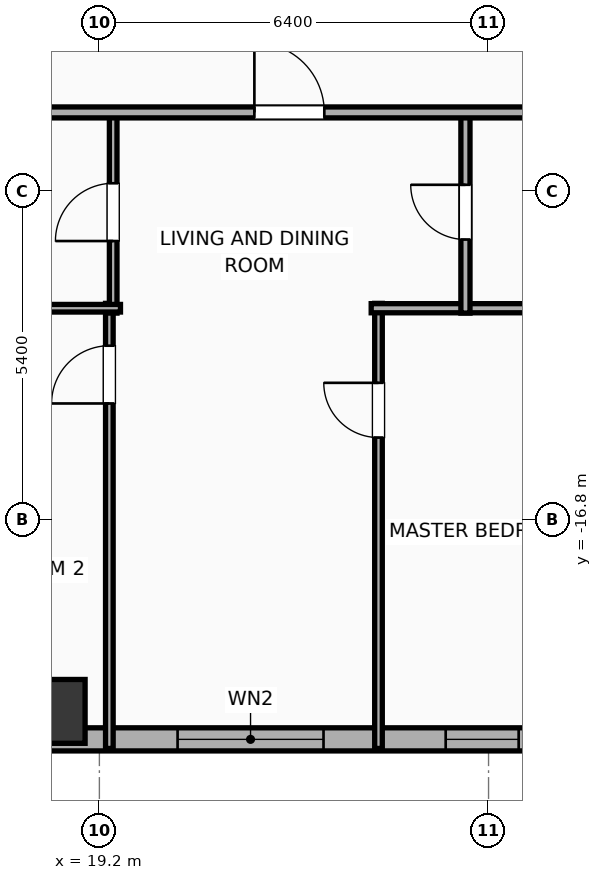
"""IFC4 building model, lengths in metres.
Left out: names, types, materials, properties, quantities, classifications, styles, units other than length and angle.
Written with IfcOpenShell. Run it as: python <this file> out.ifc"""

import sys

from ifc_helpers import new_model, si_unit, direction, frame, frame_2d, origin, origin_2d, place, context, subcontext, project, spatial, rectangle, hollow_rectangle, extrude, element, fill, save


model = new_model("IFC4")
c1 = context("Model", 3, precision=1e-05, world=origin(), true_north=direction((0.0, 1.0)))
c2 = subcontext(c1, "Body", "Model", "MODEL_VIEW")
j1 = project(units=[si_unit("LENGTHUNIT", "METRE"), si_unit("PLANEANGLEUNIT", "RADIAN")], contexts=[c1])
p1 = place(None, origin())
s1 = spatial("IfcSite", under=j1, at=p1, CompositionType="ELEMENT")
p2 = place(p1, origin())
s2 = spatial("IfcBuilding", under=s1, at=p2, CompositionType="ELEMENT")
p3 = place(p2, frame((0.0, 0.0, 101.4)))
s3 = spatial("IfcBuildingStorey", under=s2, at=p3, CompositionType="ELEMENT", Elevation=101.4)
p4 = place(p3, frame((18.44, -19.95, 0.0), z_axis=(0.0, 0.0, 1.0), x_axis=(1.0, 0.0, 0.0)))
e1 = element("IfcColumn", 1, at=p4, inside=s3, PredefinedType="COLUMN", context=c2, shape_type="SweptSolid", body=[
    extrude(hollow_rectangle(XDim=1.05, YDim=1.05, WallThickness=0.036, at=origin_2d()), origin(), (0.0, 0.0, 1.0), 3.9),
])
p5 = place(p3, frame((29.381, -20.41, 0.0), z_axis=(0.0, 0.0, 1.0), x_axis=(-1.0, 0.0, 0.0)))
e2 = element("IfcWall", 2, at=p5, inside=s3, PredefinedType="ELEMENTEDWALL", context=c2, shape_type="SweptSolid", body=[
    extrude(rectangle(XDim=54.763, YDim=0.38, at=frame_2d((27.381, 0.0))), origin(), (0.0, 0.0, 1.0), 3.65),
])
p6 = place(p5, frame((6.495, 0.0, 0.75)))
e3 = element("IfcOpeningElement", 3, at=p6, cuts=e2, PredefinedType="OPENING", context=c2, shape_type="SweptSolid", body=[
    extrude(rectangle(XDim=2.4, YDim=2.1, at=frame_2d((1.2, 1.05))), frame((0.0, 0.2, 0.0), z_axis=(0.0, -1.0, 0.0), x_axis=(1.0, 0.0, 0.0)), (0.0, 0.0, 1.0), 0.4),
])
p7 = place(p5, frame((17.686, 0.0, 0.75)))
e4 = element("IfcOpeningElement", 4, at=p7, cuts=e2, PredefinedType="OPENING", context=c2, shape_type="SweptSolid", body=[
    extrude(rectangle(XDim=2.4, YDim=2.1, at=frame_2d((1.2, 1.05))), frame((0.0, 0.2, 0.0), z_axis=(0.0, -1.0, 0.0), x_axis=(1.0, 0.0, 0.0)), (0.0, 0.0, 1.0), 0.4),
])
p8 = place(p5, frame((34.677, 0.0, 0.75)))
e5 = element("IfcOpeningElement", 5, at=p8, cuts=e2, PredefinedType="OPENING", context=c2, shape_type="SweptSolid", body=[
    extrude(rectangle(XDim=2.4, YDim=2.1, at=frame_2d((1.2, 1.05))), frame((0.0, 0.2, 0.0), z_axis=(0.0, -1.0, 0.0), x_axis=(1.0, 0.0, 0.0)), (0.0, 0.0, 1.0), 0.4),
])
p9 = place(p5, frame((45.867, 0.0, 0.75)))
e6 = element("IfcOpeningElement", 6, at=p9, cuts=e2, PredefinedType="OPENING", context=c2, shape_type="SweptSolid", body=[
    extrude(rectangle(XDim=2.4, YDim=2.1, at=frame_2d((1.2, 1.05))), frame((0.0, 0.2, 0.0), z_axis=(0.0, -1.0, 0.0), x_axis=(1.0, 0.0, 0.0)), (0.0, 0.0, 1.0), 0.4),
])
p10 = place(p5, frame((52.281, 0.0, 0.75)))
e7 = element("IfcOpeningElement", 7, at=p10, cuts=e2, PredefinedType="OPENING", context=c2, shape_type="SweptSolid", body=[
    extrude(rectangle(XDim=1.2, YDim=2.05, at=frame_2d((0.6, 1.025))), frame((0.0, 0.2, 0.0), z_axis=(0.0, -1.0, 0.0), x_axis=(1.0, 0.0, 0.0)), (0.0, 0.0, 1.0), 0.4),
])
p11 = place(p5, frame((49.641, 0.0, 0.75)))
e8 = element("IfcOpeningElement", 8, at=p11, cuts=e2, PredefinedType="OPENING", context=c2, shape_type="SweptSolid", body=[
    extrude(rectangle(XDim=1.2, YDim=2.05, at=frame_2d((0.6, 1.025))), frame((0.0, 0.2, 0.0), z_axis=(0.0, -1.0, 0.0), x_axis=(1.0, 0.0, 0.0)), (0.0, 0.0, 1.0), 0.4),
])
p12 = place(p5, frame((39.543, 0.0, 0.75)))
e9 = element("IfcOpeningElement", 9, at=p12, cuts=e2, PredefinedType="OPENING", context=c2, shape_type="SweptSolid", body=[
    extrude(rectangle(XDim=1.2, YDim=2.05, at=frame_2d((0.6, 1.025))), frame((0.0, 0.2, 0.0), z_axis=(0.0, -1.0, 0.0), x_axis=(1.0, 0.0, 0.0)), (0.0, 0.0, 1.0), 0.4),
])
p13 = place(p5, frame((44.538, 0.0, 0.75)))
e10 = element("IfcOpeningElement", 10, at=p13, cuts=e2, PredefinedType="OPENING", context=c2, shape_type="SweptSolid", body=[
    extrude(rectangle(XDim=0.52, YDim=2.05, at=frame_2d((0.26, 1.025))), frame((0.0, 0.2, 0.0), z_axis=(0.0, -1.0, 0.0), x_axis=(1.0, 0.0, 0.0)), (0.0, 0.0, 1.0), 0.4),
])
p14 = place(p5, frame((28.206, 0.0, 0.75)))
e11 = element("IfcOpeningElement", 11, at=p14, cuts=e2, PredefinedType="OPENING", context=c2, shape_type="SweptSolid", body=[
    extrude(rectangle(XDim=1.2, YDim=2.05, at=frame_2d((0.6, 1.025))), frame((0.0, 0.2, 0.0), z_axis=(0.0, -1.0, 0.0), x_axis=(1.0, 0.0, 0.0)), (0.0, 0.0, 1.0), 0.4),
])
p15 = place(p5, frame((31.241, 0.0, 0.75)))
e12 = element("IfcOpeningElement", 12, at=p15, cuts=e2, PredefinedType="OPENING", context=c2, shape_type="SweptSolid", body=[
    extrude(rectangle(XDim=0.85, YDim=2.05, at=frame_2d((0.425, 1.025))), frame((0.0, 0.2, 0.0), z_axis=(0.0, -1.0, 0.0), x_axis=(1.0, 0.0, 0.0)), (0.0, 0.0, 1.0), 0.4),
])
p16 = place(p5, frame((24.561, 0.0, 0.75)))
e13 = element("IfcOpeningElement", 13, at=p16, cuts=e2, PredefinedType="OPENING", context=c2, shape_type="SweptSolid", body=[
    extrude(rectangle(XDim=1.2, YDim=2.05, at=frame_2d((0.6, 1.025))), frame((0.0, 0.2, 0.0), z_axis=(0.0, -1.0, 0.0), x_axis=(1.0, 0.0, 0.0)), (0.0, 0.0, 1.0), 0.4),
])
p17 = place(p5, frame((22.561, 0.0, 0.75)))
e14 = element("IfcOpeningElement", 14, at=p17, cuts=e2, PredefinedType="OPENING", context=c2, shape_type="SweptSolid", body=[
    extrude(rectangle(XDim=0.52, YDim=2.05, at=frame_2d((0.26, 1.025))), frame((0.0, 0.2, 0.0), z_axis=(0.0, -1.0, 0.0), x_axis=(1.0, 0.0, 0.0)), (0.0, 0.0, 1.0), 0.4),
])
p18 = place(p5, frame((13.886, 0.0, 0.75)))
e15 = element("IfcOpeningElement", 15, at=p18, cuts=e2, PredefinedType="OPENING", context=c2, shape_type="SweptSolid", body=[
    extrude(rectangle(XDim=1.2, YDim=2.05, at=frame_2d((0.6, 1.025))), frame((0.0, 0.2, 0.0), z_axis=(0.0, -1.0, 0.0), x_axis=(1.0, 0.0, 0.0)), (0.0, 0.0, 1.0), 0.4),
])
p19 = place(p5, frame((11.694, 0.0, 0.75)))
e16 = element("IfcOpeningElement", 16, at=p19, cuts=e2, PredefinedType="OPENING", context=c2, shape_type="SweptSolid", body=[
    extrude(rectangle(XDim=0.85, YDim=2.05, at=frame_2d((0.425, 1.025))), frame((0.0, 0.2, 0.0), z_axis=(0.0, -1.0, 0.0), x_axis=(1.0, 0.0, 0.0)), (0.0, 0.0, 1.0), 0.4),
])
p20 = place(p5, frame((3.286, 0.0, 0.75)))
e17 = element("IfcOpeningElement", 17, at=p20, cuts=e2, PredefinedType="OPENING", context=c2, shape_type="SweptSolid", body=[
    extrude(rectangle(XDim=1.2, YDim=2.05, at=frame_2d((0.6, 1.025))), frame((0.0, 0.2, 0.0), z_axis=(0.0, -1.0, 0.0), x_axis=(1.0, 0.0, 0.0)), (0.0, 0.0, 1.0), 0.4),
])
p21 = place(p5, frame((0.816, 0.0, 0.75)))
e18 = element("IfcOpeningElement", 18, at=p21, cuts=e2, PredefinedType="OPENING", context=c2, shape_type="SweptSolid", body=[
    extrude(rectangle(XDim=1.2, YDim=2.05, at=frame_2d((0.6, 1.025))), frame((0.0, 0.2, 0.0), z_axis=(0.0, -1.0, 0.0), x_axis=(1.0, 0.0, 0.0)), (0.0, 0.0, 1.0), 0.4),
])
p22 = place(p3, frame((19.364, -20.56, 0.0), z_axis=(0.0, 0.0, 1.0), x_axis=(0.0, 1.0, 0.0)))
e19 = element("IfcWall", 19, at=p22, inside=s3, PredefinedType="PARTITIONING", context=c2, shape_type="SweptSolid", body=[
    extrude(rectangle(XDim=7.32, YDim=0.125, at=frame_2d((3.66, 0.0))), origin(), (0.0, 0.0, 1.0), 3.65),
])
p23 = place(p22, frame((5.674, 0.0, 0.0)))
e20 = element("IfcOpeningElement", 20, at=p23, cuts=e19, PredefinedType="OPENING", context=c2, shape_type="SweptSolid", body=[
    extrude(rectangle(XDim=0.95, YDim=2.05, at=frame_2d((0.475, 1.025))), frame((0.0, 0.073, 0.0), z_axis=(0.0, -1.0, 0.0), x_axis=(1.0, 0.0, 0.0)), (0.0, 0.0, 1.0), 0.145),
])
p24 = place(p3, frame((23.79, -20.56, 0.0), z_axis=(0.0, 0.0, 1.0), x_axis=(0.0, 1.0, 0.0)))
e21 = element("IfcWall", 21, at=p24, inside=s3, PredefinedType="PARTITIONING", context=c2, shape_type="SweptSolid", body=[
    extrude(rectangle(XDim=7.32, YDim=0.125, at=frame_2d((3.66, 0.0))), origin(), (0.0, 0.0, 1.0), 3.65),
])
p25 = place(p24, frame((5.113, 0.0, 0.0)))
e22 = element("IfcOpeningElement", 22, at=p25, cuts=e21, PredefinedType="OPENING", context=c2, shape_type="SweptSolid", body=[
    extrude(rectangle(XDim=0.9, YDim=2.05, at=frame_2d((0.45, 1.025))), frame((0.0, 0.073, 0.0), z_axis=(0.0, -1.0, 0.0), x_axis=(1.0, 0.0, 0.0)), (0.0, 0.0, 1.0), 0.145),
])
p26 = place(p3, frame((23.67, -13.32, 0.0), z_axis=(0.0, 0.0, 1.0), x_axis=(1.0, 0.0, 0.0)))
e23 = element("IfcWall", 23, at=p26, inside=s3, PredefinedType="PLUMBINGWALL", context=c2, shape_type="SweptSolid", body=[
    extrude(rectangle(XDim=3.79, YDim=0.15, at=frame_2d((1.895, 0.0))), origin(), (0.0, 0.0, 1.0), 3.65),
])
p27 = place(p3, frame((19.427, -13.4, 0.0), z_axis=(0.0, 0.0, 1.0), x_axis=(0.0, 1.0, 0.0)))
e24 = element("IfcWall", 24, at=p27, inside=s3, PredefinedType="PARTITIONING", context=c2, shape_type="SweptSolid", body=[
    extrude(rectangle(XDim=3.32, YDim=0.125, at=frame_2d((1.66, 0.0))), origin(), (0.0, 0.0, 1.0), 3.65),
])
p28 = place(p27, frame((1.185, 0.0, 0.0)))
e25 = element("IfcOpeningElement", 25, at=p28, cuts=e24, PredefinedType="OPENING", context=c2, shape_type="SweptSolid", body=[
    extrude(rectangle(XDim=0.95, YDim=2.05, at=frame_2d((0.475, 1.025))), frame((0.0, 0.073, 0.0), z_axis=(0.0, -1.0, 0.0), x_axis=(1.0, 0.0, 0.0)), (0.0, 0.0, 1.0), 0.145),
])
p29 = place(p3, frame((16.525, -13.32, 0.0), z_axis=(0.0, 0.0, 1.0), x_axis=(1.0, 0.0, 0.0)))
e26 = element("IfcWall", 26, at=p29, inside=s3, PredefinedType="PARTITIONING", context=c2, shape_type="SweptSolid", body=[
    extrude(rectangle(XDim=3.022, YDim=0.125, at=frame_2d((1.511, 0.0))), origin(), (0.0, 0.0, 1.0), 3.65),
])
p30 = place(p3, frame((25.22, -13.4, 0.0), z_axis=(0.0, 0.0, 1.0), x_axis=(0.0, 1.0, 0.0)))
e27 = element("IfcWall", 27, at=p30, inside=s3, PredefinedType="PLUMBINGWALL", context=c2, shape_type="SweptSolid", body=[
    extrude(rectangle(XDim=3.32, YDim=0.15, at=frame_2d((1.66, 0.0))), origin(), (0.0, 0.0, 1.0), 3.65),
])
p31 = place(p30, frame((1.21, 0.0, 0.0)))
e28 = element("IfcOpeningElement", 28, at=p31, cuts=e27, PredefinedType="OPENING", context=c2, shape_type="SweptSolid", body=[
    extrude(rectangle(XDim=0.9, YDim=2.05, at=frame_2d((0.45, 1.025))), frame((0.0, 0.085, 0.0), z_axis=(0.0, -1.0, 0.0), x_axis=(1.0, 0.0, 0.0)), (0.0, 0.0, 1.0), 0.17),
])
p32 = place(p3, frame((-29.21, -10.1, 0.0), z_axis=(0.0, 0.0, 1.0), x_axis=(1.0, 0.0, 0.0)))
e29 = element("IfcWall", 29, at=p32, inside=s3, PredefinedType="PARTITIONING", context=c2, shape_type="SweptSolid", body=[
    extrude(rectangle(XDim=62.42, YDim=0.18, at=frame_2d((31.21, 0.0))), origin(), (0.0, 0.0, 1.0), 3.65),
])
p33 = place(p32, frame((3.033, 0.0, 0.0)))
e30 = element("IfcOpeningElement", 30, at=p33, cuts=e29, PredefinedType="OPENING", context=c2, shape_type="SweptSolid", body=[
    extrude(rectangle(XDim=0.9, YDim=2.05, at=frame_2d((0.45, 1.025))), frame((0.0, 0.1, 0.0), z_axis=(0.0, -1.0, 0.0), x_axis=(1.0, 0.0, 0.0)), (0.0, 0.0, 1.0), 0.2),
])
p34 = place(p32, frame((9.768, 0.0, 0.0)))
e31 = element("IfcOpeningElement", 31, at=p34, cuts=e29, PredefinedType="OPENING", context=c2, shape_type="SweptSolid", body=[
    extrude(rectangle(XDim=0.9, YDim=2.05, at=frame_2d((0.45, 1.025))), frame((0.0, 0.1, 0.0), z_axis=(0.0, -1.0, 0.0), x_axis=(1.0, 0.0, 0.0)), (0.0, 0.0, 1.0), 0.2),
])
p35 = place(p32, frame((18.65, 0.0, 0.0)))
e32 = element("IfcOpeningElement", 32, at=p35, cuts=e29, PredefinedType="OPENING", context=c2, shape_type="SweptSolid", body=[
    extrude(rectangle(XDim=1.15, YDim=2.05, at=frame_2d((0.575, 1.025))), frame((0.0, 0.1, 0.0), z_axis=(0.0, -1.0, 0.0), x_axis=(1.0, 0.0, 0.0)), (0.0, 0.0, 1.0), 0.2),
])
p36 = place(p32, frame((29.212, 0.0, 0.0)))
e33 = element("IfcOpeningElement", 33, at=p36, cuts=e29, PredefinedType="OPENING", context=c2, shape_type="SweptSolid", body=[
    extrude(rectangle(XDim=1.15, YDim=2.05, at=frame_2d((0.575, 1.025))), frame((0.0, 0.1, 0.0), z_axis=(0.0, -1.0, 0.0), x_axis=(1.0, 0.0, 0.0)), (0.0, 0.0, 1.0), 0.2),
])
p37 = place(p32, frame((40.379, 0.0, 0.0)))
e34 = element("IfcOpeningElement", 34, at=p37, cuts=e29, PredefinedType="OPENING", context=c2, shape_type="SweptSolid", body=[
    extrude(rectangle(XDim=1.15, YDim=2.05, at=frame_2d((0.575, 1.025))), frame((0.0, 0.1, 0.0), z_axis=(0.0, -1.0, 0.0), x_axis=(1.0, 0.0, 0.0)), (0.0, 0.0, 1.0), 0.2),
])
p38 = place(p32, frame((50.959, 0.0, 0.0)))
e35 = element("IfcOpeningElement", 35, at=p38, cuts=e29, PredefinedType="OPENING", context=c2, shape_type="SweptSolid", body=[
    extrude(rectangle(XDim=1.15, YDim=2.05, at=frame_2d((0.575, 1.025))), frame((0.0, 0.1, 0.0), z_axis=(0.0, -1.0, 0.0), x_axis=(1.0, 0.0, 0.0)), (0.0, 0.0, 1.0), 0.2),
])
p39 = place(p32, frame((59.117, 0.0, 0.0)))
e36 = element("IfcOpeningElement", 36, at=p39, cuts=e29, PredefinedType="OPENING", context=c2, shape_type="SweptSolid", body=[
    extrude(rectangle(XDim=0.9, YDim=2.05, at=frame_2d((0.45, 1.025))), frame((0.0, 0.1, 0.0), z_axis=(0.0, -1.0, 0.0), x_axis=(1.0, 0.0, 0.0)), (0.0, 0.0, 1.0), 0.2),
])
p40 = place(p6, origin())
e37 = element("IfcWindow", 37, at=p40, inside=s3, PartitioningType="SINGLE_PANEL", PredefinedType="WINDOW", context=c2, shape_type="SweptSolid", body=[
    extrude(rectangle(XDim=2.4, YDim=2.1, at=frame_2d((1.2, 1.05))), frame((0.0, 0.03, 0.0), z_axis=(0.0, -1.0, 0.0), x_axis=(1.0, 0.0, 0.0)), (0.0, 0.0, 1.0), 0.06),
])
fill(e3, e37)
p41 = place(p20, origin())
e38 = element("IfcWindow", 38, at=p41, inside=s3, PartitioningType="SINGLE_PANEL", PredefinedType="WINDOW", context=c2, shape_type="SweptSolid", body=[
    extrude(rectangle(XDim=1.2, YDim=2.05, at=frame_2d((0.6, 1.025))), frame((0.0, 0.03, 0.0), z_axis=(0.0, -1.0, 0.0), x_axis=(1.0, 0.0, 0.0)), (0.0, 0.0, 1.0), 0.06),
])
fill(e17, e38)
p42 = place(p23, origin())
e39 = element("IfcDoor", 39, at=p42, inside=s3, OperationType="SINGLE_SWING_LEFT", PredefinedType="DOOR", context=c2, shape_type="SweptSolid", body=[
    extrude(rectangle(XDim=0.95, YDim=2.05, at=frame_2d((0.475, 1.025))), frame((0.0, 0.025, 0.0), z_axis=(0.0, -1.0, 0.0), x_axis=(1.0, 0.0, 0.0)), (0.0, 0.0, 1.0), 0.05),
])
fill(e20, e39)
p43 = place(p25, origin())
e40 = element("IfcDoor", 40, at=p43, inside=s3, OperationType="SINGLE_SWING_RIGHT", PredefinedType="DOOR", context=c2, shape_type="SweptSolid", body=[
    extrude(rectangle(XDim=0.9, YDim=2.05, at=frame_2d((0.45, 1.025))), frame((0.0, 0.025, 0.0), z_axis=(0.0, -1.0, 0.0), x_axis=(1.0, 0.0, 0.0)), (0.0, 0.0, 1.0), 0.05),
])
fill(e22, e40)
p44 = place(p28, origin())
e41 = element("IfcDoor", 41, at=p44, inside=s3, OperationType="SINGLE_SWING_LEFT", PredefinedType="DOOR", context=c2, shape_type="SweptSolid", body=[
    extrude(rectangle(XDim=0.95, YDim=2.05, at=frame_2d((0.475, 1.025))), frame((0.0, 0.025, 0.0), z_axis=(0.0, -1.0, 0.0), x_axis=(1.0, 0.0, 0.0)), (0.0, 0.0, 1.0), 0.05),
])
fill(e25, e41)
p45 = place(p31, origin())
e42 = element("IfcDoor", 42, at=p45, inside=s3, OperationType="SINGLE_SWING_RIGHT", PredefinedType="DOOR", context=c2, shape_type="SweptSolid", body=[
    extrude(rectangle(XDim=0.9, YDim=2.05, at=frame_2d((0.45, 1.025))), frame((0.0, 0.025, 0.0), z_axis=(0.0, -1.0, 0.0), x_axis=(1.0, 0.0, 0.0)), (0.0, 0.0, 1.0), 0.05),
])
fill(e28, e42)
p46 = place(p38, origin())
e43 = element("IfcDoor", 43, at=p46, inside=s3, OperationType="SINGLE_SWING_LEFT", PredefinedType="DOOR", context=c2, shape_type="SweptSolid", body=[
    extrude(rectangle(XDim=1.15, YDim=2.05, at=frame_2d((0.575, 1.025))), frame((0.0, 0.025, 0.0), z_axis=(0.0, -1.0, 0.0), x_axis=(1.0, 0.0, 0.0)), (0.0, 0.0, 1.0), 0.05),
])
fill(e35, e43)
save(model, sys.argv[1])
